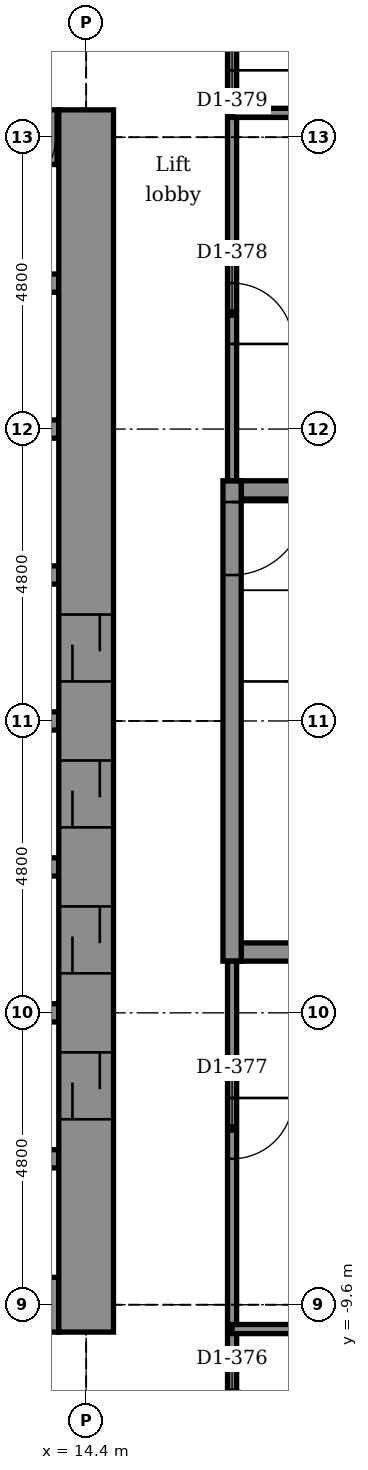
"""IFC4 building model, lengths in metres.
Left out: names, types, materials, properties, quantities, classifications, styles, units other than length and angle.
Written with IfcOpenShell. Run it as: python <this file> out.ifc"""

import sys

from ifc_helpers import new_model, si_unit, direction, frame, frame_2d, origin, place, context, subcontext, project, spatial, rectangle, extrude, element, fill, save


model = new_model("IFC4")
c1 = context("Model", 3, precision=1e-05, world=origin(), true_north=direction((0.0, 1.0)))
c2 = subcontext(c1, "Body", "Model", "MODEL_VIEW")
j1 = project(units=[si_unit("LENGTHUNIT", "METRE"), si_unit("PLANEANGLEUNIT", "RADIAN")], contexts=[c1])
p1 = place(None, origin())
s1 = spatial("IfcSite", under=j1, at=p1, CompositionType="ELEMENT")
p2 = place(p1, origin())
s2 = spatial("IfcBuilding", under=s1, at=p2, CompositionType="ELEMENT")
p3 = place(p2, frame((0.0, 0.0, 127.4)))
s3 = spatial("IfcBuildingStorey", under=s2, at=p3, CompositionType="ELEMENT", Elevation=127.4)
p4 = place(p3, frame((10.05, -9.6, -0.3), z_axis=(0.0, 0.0, 1.0), x_axis=(1.0, 0.0, 0.0)))
e1 = element("IfcWall", 1, at=p4, inside=s3, PredefinedType="SHEAR", context=c2, shape_type="SweptSolid", body=[
    extrude(rectangle(XDim=3.9, YDim=0.9, at=frame_2d((1.95, 0.0))), origin(), (0.0, 0.0, 1.0), 6.15),
])
p5 = place(p4, frame((0.1, 0.0, 0.3)))
e2 = element("IfcOpeningElement", 2, at=p5, cuts=e1, PredefinedType="OPENING", context=c2, shape_type="SweptSolid", body=[
    extrude(rectangle(XDim=0.9, YDim=2.1, at=frame_2d((0.45, 1.05))), frame((0.0, 0.46, 0.0), z_axis=(0.0, -1.0, 0.0), x_axis=(1.0, 0.0, 0.0)), (0.0, 0.0, 1.0), 0.92),
])
p6 = place(p4, frame((2.5, 0.0, 0.3)))
e3 = element("IfcOpeningElement", 3, at=p6, cuts=e1, PredefinedType="OPENING", context=c2, shape_type="SweptSolid", body=[
    extrude(rectangle(XDim=0.9, YDim=2.1, at=frame_2d((0.45, 1.05))), frame((0.0, 0.46, 0.0), z_axis=(0.0, -1.0, 0.0), x_axis=(1.0, 0.0, 0.0)), (0.0, 0.0, 1.0), 0.92),
])
p7 = place(p3, frame((10.05, -7.2, -0.3), z_axis=(0.0, 0.0, 1.0), x_axis=(1.0, 0.0, 0.0)))
e4 = element("IfcWall", 4, at=p7, inside=s3, PredefinedType="STANDARD", context=c2, shape_type="SweptSolid", body=[
    extrude(rectangle(XDim=3.9, YDim=0.3, at=frame_2d((1.95, 0.0))), origin(), (0.0, 0.0, 1.0), 6.15),
])
p8 = place(p3, frame((10.05, -4.8, -0.3), z_axis=(0.0, 0.0, 1.0), x_axis=(1.0, 0.0, 0.0)))
e5 = element("IfcWall", 5, at=p8, inside=s3, PredefinedType="STANDARD", context=c2, shape_type="SweptSolid", body=[
    extrude(rectangle(XDim=3.9, YDim=0.3, at=frame_2d((1.95, 0.0))), origin(), (0.0, 0.0, 1.0), 4.7),
])
p9 = place(p3, frame((16.95, -3.8, -0.3), z_axis=(0.0, 0.0, 1.0), x_axis=(1.0, 0.0, 0.0)))
e6 = element("IfcWall", 6, at=p9, inside=s3, PredefinedType="STANDARD", context=c2, shape_type="SweptSolid", body=[
    extrude(rectangle(XDim=4.5, YDim=0.3, at=frame_2d((2.25, 0.0))), origin(), (0.0, 0.0, 1.0), 6.15),
])
for number, where, z_axis, x_axis in (
    (7, (10.05, -2.4, -0.3), (0.0, 0.0, 1.0), (1.0, 0.0, 0.0)),
    (8, (10.05, 0.0, -0.3), (0.0, 0.0, 1.0), (1.0, 0.0, 0.0)),
):
    element("IfcWall", number, at=place(p3, frame(where, z_axis=z_axis, x_axis=x_axis)), inside=s3, PredefinedType="STANDARD", context=c2, shape_type="SweptSolid", body=[
        extrude(rectangle(XDim=3.9, YDim=0.3, at=frame_2d((1.95, 0.0))), origin(), (0.0, 0.0, 1.0), 4.7),
    ])
p10 = place(p3, frame((10.05, 2.4, -0.3), z_axis=(0.0, 0.0, 1.0), x_axis=(1.0, 0.0, 0.0)))
e9 = element("IfcWall", 9, at=p10, inside=s3, PredefinedType="STANDARD", context=c2, shape_type="SweptSolid", body=[
    extrude(rectangle(XDim=3.9, YDim=0.3, at=frame_2d((1.95, 0.0))), origin(), (0.0, 0.0, 1.0), 6.15),
])
p11 = place(p3, frame((16.95, 3.8, -0.3), z_axis=(0.0, 0.0, 1.0), x_axis=(1.0, 0.0, 0.0)))
e10 = element("IfcWall", 10, at=p11, inside=s3, PredefinedType="STANDARD", context=c2, shape_type="SweptSolid", body=[
    extrude(rectangle(XDim=4.5, YDim=0.3, at=frame_2d((2.25, 0.0))), origin(), (0.0, 0.0, 1.0), 6.15),
])
for number, where, z_axis, x_axis in (
    (11, (10.05, 4.8, -0.3), (0.0, 0.0, 1.0), (1.0, 0.0, 0.0)),
    (12, (10.05, 7.2, -0.3), (0.0, 0.0, 1.0), (1.0, 0.0, 0.0)),
):
    element("IfcWall", number, at=place(p3, frame(where, z_axis=z_axis, x_axis=x_axis)), inside=s3, PredefinedType="STANDARD", context=c2, shape_type="SweptSolid", body=[
        extrude(rectangle(XDim=3.9, YDim=0.3, at=frame_2d((1.95, 0.0))), origin(), (0.0, 0.0, 1.0), 6.15),
    ])
p12 = place(p3, frame((10.05, 9.6, -0.3), z_axis=(0.0, 0.0, 1.0), x_axis=(1.0, 0.0, 0.0)))
e13 = element("IfcWall", 13, at=p12, inside=s3, PredefinedType="SHEAR", context=c2, shape_type="SweptSolid", body=[
    extrude(rectangle(XDim=3.9, YDim=0.9, at=frame_2d((1.95, 0.0))), origin(), (0.0, 0.0, 1.0), 6.15),
])
p13 = place(p12, frame((0.7, 0.0, 0.3)))
e14 = element("IfcOpeningElement", 14, at=p13, cuts=e13, PredefinedType="OPENING", context=c2, shape_type="SweptSolid", body=[
    extrude(rectangle(XDim=0.9, YDim=2.1, at=frame_2d((0.45, 1.05))), frame((0.0, 0.46, 0.0), z_axis=(0.0, -1.0, 0.0), x_axis=(1.0, 0.0, 0.0)), (0.0, 0.0, 1.0), 0.92),
])
p14 = place(p12, frame((2.95, 0.0, 0.3)))
e15 = element("IfcOpeningElement", 15, at=p14, cuts=e13, PredefinedType="OPENING", context=c2, shape_type="SweptSolid", body=[
    extrude(rectangle(XDim=0.9, YDim=2.1, at=frame_2d((0.45, 1.05))), frame((0.0, 0.46, 0.0), z_axis=(0.0, -1.0, 0.0), x_axis=(1.0, 0.0, 0.0)), (0.0, 0.0, 1.0), 0.92),
])
p15 = place(p3, frame((14.4, -10.05, -0.3), z_axis=(0.0, 0.0, 1.0), x_axis=(0.0, 1.0, 0.0)))
e16 = element("IfcWall", 16, at=p15, inside=s3, PredefinedType="SHEAR", context=c2, shape_type="SweptSolid", body=[
    extrude(rectangle(XDim=20.1, YDim=0.9, at=frame_2d((10.05, 0.0))), origin(), (0.0, 0.0, 1.0), 6.15),
])
p16 = place(p15, frame((3.5, 0.0, 0.3)))
e17 = element("IfcOpeningElement", 17, at=p16, cuts=e16, PredefinedType="OPENING", context=c2, shape_type="SweptSolid", body=[
    extrude(rectangle(XDim=1.1, YDim=2.1, at=frame_2d((0.55, 1.05))), frame((0.0, 0.46, 0.0), z_axis=(0.0, -1.0, 0.0), x_axis=(1.0, 0.0, 0.0)), (0.0, 0.0, 1.0), 0.92),
])
p17 = place(p15, frame((5.9, 0.0, 0.3)))
e18 = element("IfcOpeningElement", 18, at=p17, cuts=e16, PredefinedType="OPENING", context=c2, shape_type="SweptSolid", body=[
    extrude(rectangle(XDim=1.1, YDim=2.1, at=frame_2d((0.55, 1.05))), frame((0.0, 0.46, 0.0), z_axis=(0.0, -1.0, 0.0), x_axis=(1.0, 0.0, 0.0)), (0.0, 0.0, 1.0), 0.92),
])
p18 = place(p15, frame((8.3, 0.0, 0.3)))
e19 = element("IfcOpeningElement", 19, at=p18, cuts=e16, PredefinedType="OPENING", context=c2, shape_type="SweptSolid", body=[
    extrude(rectangle(XDim=1.1, YDim=2.1, at=frame_2d((0.55, 1.05))), frame((0.0, 0.46, 0.0), z_axis=(0.0, -1.0, 0.0), x_axis=(1.0, 0.0, 0.0)), (0.0, 0.0, 1.0), 0.92),
])
p19 = place(p15, frame((10.7, 0.0, 0.3)))
e20 = element("IfcOpeningElement", 20, at=p19, cuts=e16, PredefinedType="OPENING", context=c2, shape_type="SweptSolid", body=[
    extrude(rectangle(XDim=1.1, YDim=2.1, at=frame_2d((0.55, 1.05))), frame((0.0, 0.46, 0.0), z_axis=(0.0, -1.0, 0.0), x_axis=(1.0, 0.0, 0.0)), (0.0, 0.0, 1.0), 0.92),
])
p20 = place(p3, frame((16.8, -3.95, -0.3), z_axis=(0.0, 0.0, 1.0), x_axis=(0.0, 1.0, 0.0)))
e21 = element("IfcWall", 21, at=p20, inside=s3, PredefinedType="STANDARD", context=c2, shape_type="SweptSolid", body=[
    extrude(rectangle(XDim=7.9, YDim=0.3, at=frame_2d((3.95, 0.0))), origin(), (0.0, 0.0, 1.0), 6.15),
])
p21 = place(p20, frame((6.35, 0.0, 0.3)))
e22 = element("IfcOpeningElement", 22, at=p21, cuts=e21, PredefinedType="OPENING", context=c2, shape_type="SweptSolid", body=[
    extrude(rectangle(XDim=1.2, YDim=2.1, at=frame_2d((0.6, 1.05))), frame((0.0, 0.16, 0.0), z_axis=(0.0, -1.0, 0.0), x_axis=(1.0, 0.0, 0.0)), (0.0, 0.0, 1.0), 0.32),
])
p22 = place(p3, frame((16.8, -13.0, 0.0), z_axis=(0.0, 0.0, 1.0), x_axis=(0.0, 1.0, 0.0)))
e23 = element("IfcWall", 23, at=p22, inside=s3, PredefinedType="PARTITIONING", context=c2, shape_type="SweptSolid", body=[
    extrude(rectangle(XDim=9.05, YDim=0.15, at=frame_2d((4.525, 0.0))), origin(), (0.0, 0.0, 1.0), 5.85),
])
p23 = place(p22, frame((1.0, 0.0, 0.0)))
e24 = element("IfcOpeningElement", 24, at=p23, cuts=e23, PredefinedType="OPENING", context=c2, shape_type="SweptSolid", body=[
    extrude(rectangle(XDim=1.0, YDim=2.1, at=frame_2d((0.5, 1.05))), frame((0.0, 0.085, 0.0), z_axis=(0.0, -1.0, 0.0), x_axis=(1.0, 0.0, 0.0)), (0.0, 0.0, 1.0), 0.17),
])
p24 = place(p22, frame((5.8, 0.0, 0.0)))
e25 = element("IfcOpeningElement", 25, at=p24, cuts=e23, PredefinedType="OPENING", context=c2, shape_type="SweptSolid", body=[
    extrude(rectangle(XDim=1.0, YDim=2.1, at=frame_2d((0.5, 1.05))), frame((0.0, 0.085, 0.0), z_axis=(0.0, -1.0, 0.0), x_axis=(1.0, 0.0, 0.0)), (0.0, 0.0, 1.0), 0.17),
])
p25 = place(p3, frame((16.8, 3.95, 0.0), z_axis=(0.0, 0.0, 1.0), x_axis=(0.0, 1.0, 0.0)))
e26 = element("IfcWall", 26, at=p25, inside=s3, PredefinedType="PARTITIONING", context=c2, shape_type="SweptSolid", body=[
    extrude(rectangle(XDim=8.45, YDim=0.15, at=frame_2d((4.225, 0.0))), origin(), (0.0, 0.0, 1.0), 5.85),
])
p26 = place(p25, frame((2.25, 0.0, 0.0)))
e27 = element("IfcOpeningElement", 27, at=p26, cuts=e26, PredefinedType="OPENING", context=c2, shape_type="SweptSolid", body=[
    extrude(rectangle(XDim=1.0, YDim=2.1, at=frame_2d((0.5, 1.05))), frame((0.0, 0.085, 0.0), z_axis=(0.0, -1.0, 0.0), x_axis=(1.0, 0.0, 0.0)), (0.0, 0.0, 1.0), 0.17),
])
p27 = place(p25, frame((6.75, 0.0, 0.0)))
e28 = element("IfcOpeningElement", 28, at=p27, cuts=e26, PredefinedType="OPENING", context=c2, shape_type="SweptSolid", body=[
    extrude(rectangle(XDim=1.0, YDim=2.1, at=frame_2d((0.5, 1.05))), frame((0.0, 0.085, 0.0), z_axis=(0.0, -1.0, 0.0), x_axis=(1.0, 0.0, 0.0)), (0.0, 0.0, 1.0), 0.17),
])
for number, where, z_axis, x_axis in (
    (29, (16.8, -10.0, 0.0), (0.0, 0.0, 1.0), (1.0, 0.0, 0.0)),
    (30, (16.8, 10.0, 0.0), (0.0, 0.0, 1.0), (1.0, 0.0, 0.0)),
):
    element("IfcWall", number, at=place(p3, frame(where, z_axis=z_axis, x_axis=x_axis)), inside=s3, PredefinedType="PARTITIONING", context=c2, shape_type="SweptSolid", body=[
        extrude(rectangle(XDim=1.9, YDim=0.15, at=frame_2d((0.95, 0.0))), origin(), (0.0, 0.0, 1.0), 5.85),
    ])
p28 = place(p24, frame((1.0, 0.0, 0.0), z_axis=(0.0, 0.0, 1.0), x_axis=(-1.0, 0.0, 0.0)))
e31 = element("IfcDoor", 31, at=p28, inside=s3, OperationType="SINGLE_SWING_RIGHT", PredefinedType="DOOR", context=c2, shape_type="SweptSolid", body=[
    extrude(rectangle(XDim=1.0, YDim=2.1, at=frame_2d((0.5, 1.05))), frame((0.0, 0.025, 0.0), z_axis=(0.0, -1.0, 0.0), x_axis=(1.0, 0.0, 0.0)), (0.0, 0.0, 1.0), 0.05),
])
fill(e25, e31)
p29 = place(p26, frame((1.0, 0.0, 0.0), z_axis=(0.0, 0.0, 1.0), x_axis=(-1.0, 0.0, 0.0)))
e32 = element("IfcDoor", 32, at=p29, inside=s3, OperationType="SINGLE_SWING_LEFT", PredefinedType="DOOR", context=c2, shape_type="SweptSolid", body=[
    extrude(rectangle(XDim=1.0, YDim=2.1, at=frame_2d((0.5, 1.05))), frame((0.0, 0.025, 0.0), z_axis=(0.0, -1.0, 0.0), x_axis=(1.0, 0.0, 0.0)), (0.0, 0.0, 1.0), 0.05),
])
fill(e27, e32)
p30 = place(p27, frame((1.0, 0.0, 0.0), z_axis=(0.0, 0.0, 1.0), x_axis=(-1.0, 0.0, 0.0)))
e33 = element("IfcDoor", 33, at=p30, inside=s3, OperationType="SINGLE_SWING_LEFT", PredefinedType="DOOR", context=c2, shape_type="SweptSolid", body=[
    extrude(rectangle(XDim=1.0, YDim=2.1, at=frame_2d((0.5, 1.05))), frame((0.0, 0.025, 0.0), z_axis=(0.0, -1.0, 0.0), x_axis=(1.0, 0.0, 0.0)), (0.0, 0.0, 1.0), 0.05),
])
fill(e28, e33)
p31 = place(p16, origin())
e34 = element("IfcDoor", 34, at=p31, inside=s3, OperationType="DOUBLE_DOOR_SLIDING", PredefinedType="DOOR", context=c2, shape_type="SweptSolid", body=[
    extrude(rectangle(XDim=1.1, YDim=2.1, at=frame_2d((0.55, 1.05))), frame((0.0, 0.025, 0.0), z_axis=(0.0, -1.0, 0.0), x_axis=(1.0, 0.0, 0.0)), (0.0, 0.0, 1.0), 0.05),
])
fill(e17, e34)
p32 = place(p17, origin())
e35 = element("IfcDoor", 35, at=p32, inside=s3, OperationType="DOUBLE_DOOR_SLIDING", PredefinedType="DOOR", context=c2, shape_type="SweptSolid", body=[
    extrude(rectangle(XDim=1.1, YDim=2.1, at=frame_2d((0.55, 1.05))), frame((0.0, 0.025, 0.0), z_axis=(0.0, -1.0, 0.0), x_axis=(1.0, 0.0, 0.0)), (0.0, 0.0, 1.0), 0.05),
])
fill(e18, e35)
p33 = place(p18, origin())
e36 = element("IfcDoor", 36, at=p33, inside=s3, OperationType="DOUBLE_DOOR_SLIDING", PredefinedType="DOOR", context=c2, shape_type="SweptSolid", body=[
    extrude(rectangle(XDim=1.1, YDim=2.1, at=frame_2d((0.55, 1.05))), frame((0.0, 0.025, 0.0), z_axis=(0.0, -1.0, 0.0), x_axis=(1.0, 0.0, 0.0)), (0.0, 0.0, 1.0), 0.05),
])
fill(e19, e36)
p34 = place(p19, origin())
e37 = element("IfcDoor", 37, at=p34, inside=s3, OperationType="DOUBLE_DOOR_SLIDING", PredefinedType="DOOR", context=c2, shape_type="SweptSolid", body=[
    extrude(rectangle(XDim=1.1, YDim=2.1, at=frame_2d((0.55, 1.05))), frame((0.0, 0.025, 0.0), z_axis=(0.0, -1.0, 0.0), x_axis=(1.0, 0.0, 0.0)), (0.0, 0.0, 1.0), 0.05),
])
fill(e20, e37)
p35 = place(p21, frame((1.2, 0.0, 0.0), z_axis=(0.0, 0.0, 1.0), x_axis=(-1.0, 0.0, 0.0)))
e38 = element("IfcDoor", 38, at=p35, inside=s3, OperationType="SINGLE_SWING_RIGHT", PredefinedType="DOOR", context=c2, shape_type="SweptSolid", body=[
    extrude(rectangle(XDim=1.2, YDim=2.1, at=frame_2d((0.6, 1.05))), frame((0.0, 0.025, 0.0), z_axis=(0.0, -1.0, 0.0), x_axis=(1.0, 0.0, 0.0)), (0.0, 0.0, 1.0), 0.05),
])
fill(e22, e38)
p36 = place(p14, frame((0.9, 0.0, 0.0), z_axis=(0.0, 0.0, 1.0), x_axis=(-1.0, 0.0, 0.0)))
e39 = element("IfcDoor", 39, at=p36, inside=s3, OperationType="SINGLE_SWING_LEFT", PredefinedType="DOOR", context=c2, shape_type="SweptSolid", body=[
    extrude(rectangle(XDim=0.9, YDim=2.1, at=frame_2d((0.45, 1.05))), frame((0.0, 0.025, 0.0), z_axis=(0.0, -1.0, 0.0), x_axis=(1.0, 0.0, 0.0)), (0.0, 0.0, 1.0), 0.05),
])
fill(e15, e39)
save(model, sys.argv[1])
